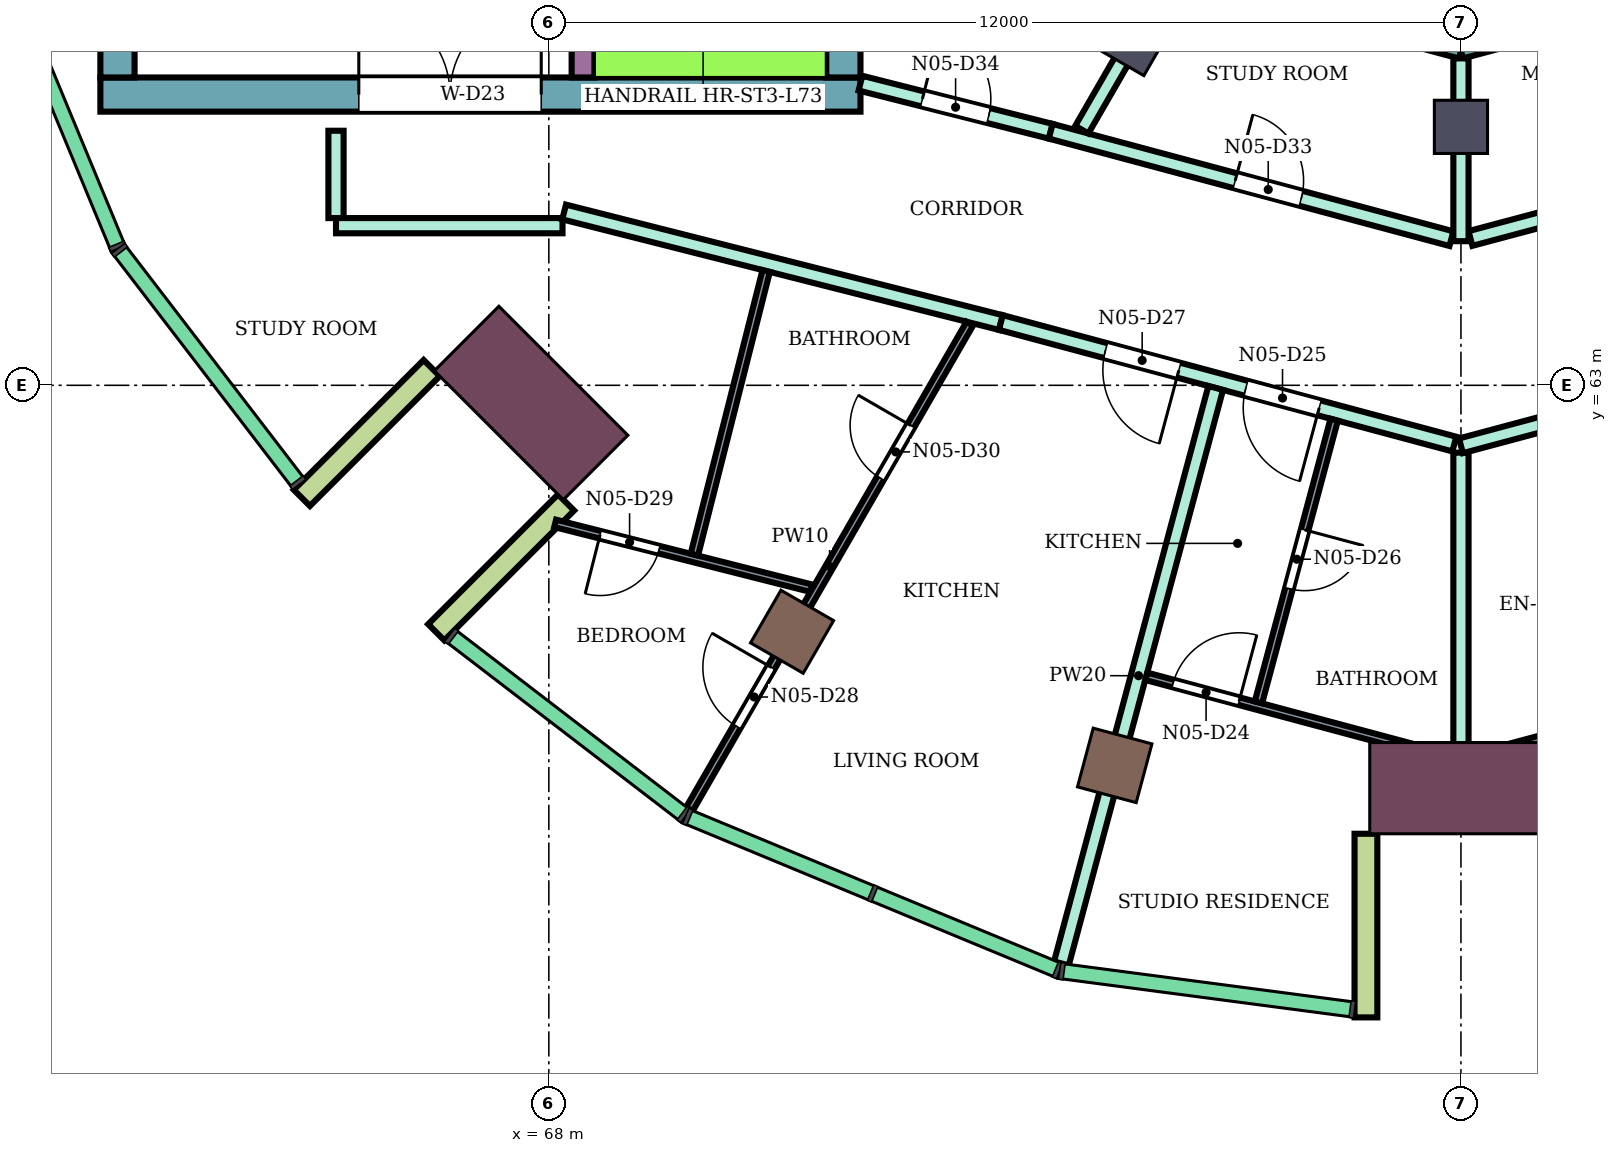
"""IFC4 building model, lengths in metres.
Left out: names, types, materials, properties, quantities, classifications, styles, units other than length and angle.
Written with IfcOpenShell. Run it as: python <this file> out.ifc"""

import sys

from ifc_helpers import new_model, si_unit, direction, frame, frame_2d, origin, origin_2d, place, context, subcontext, project, spatial, rectangle, extrude, element, fill, save


model = new_model("IFC4")
c1 = context("Model", 3, precision=1e-05, world=origin(), true_north=direction((0.0, 1.0)))
c2 = subcontext(c1, "Body", "Model", "MODEL_VIEW")
j1 = project(units=[si_unit("LENGTHUNIT", "METRE"), si_unit("PLANEANGLEUNIT", "RADIAN")], contexts=[c1])
p1 = place(None, origin())
s1 = spatial("IfcSite", under=j1, at=p1, CompositionType="ELEMENT")
p2 = place(p1, origin())
s2 = spatial("IfcBuilding", under=s1, at=p2, CompositionType="ELEMENT")
p3 = place(p2, frame((0.0, 0.0, 319.3)))
s3 = spatial("IfcBuildingStorey", under=s2, at=p3, CompositionType="ELEMENT", Elevation=319.3)
for number, where, z_axis, x_axis in (
    (1, (71.2, 59.758, 0.0), (0.0, 0.0, 1.0), (-0.5, -0.866, 0.0)),
    (2, (75.445, 58.0, 0.0), (0.0, 0.0, 1.0), (-0.259, -0.966, 0.0)),
):
    element("IfcColumn", number, at=place(p3, frame(where, z_axis=z_axis, x_axis=x_axis)), inside=s3, PredefinedType="COLUMN", context=c2, shape_type="SweptSolid", body=[
        extrude(rectangle(XDim=0.8, YDim=0.8, at=origin_2d()), origin(), (0.0, 0.0, 1.0), 4.4),
    ])
for number, where, z_axis, x_axis in (
    (3, (75.7, 67.552, 0.0), (0.0, 0.0, 1.0), (-0.5, -0.866, 0.0)),
    (4, (80.0, 66.4, 0.0), (0.0, 0.0, 1.0), (0.0, -1.0, 0.0)),
):
    element("IfcColumn", number, at=place(p3, frame(where, z_axis=z_axis, x_axis=x_axis)), inside=s3, PredefinedType="COLUMN", context=c2, shape_type="SweptSolid", body=[
        extrude(rectangle(XDim=0.7, YDim=0.7, at=origin_2d()), origin(), (0.0, 0.0, 1.0), 4.4),
    ])
for number, where, z_axis, x_axis in (
    (5, (67.767, 62.767, 0.0), (0.0, 0.0, 1.0), (-0.707, -0.707, 0.0)),
    (6, (80.0, 57.7, 0.0), (0.0, 0.0, 1.0), (0.0, -1.0, 0.0)),
):
    element("IfcColumn", number, at=place(p3, frame(where, z_axis=z_axis, x_axis=x_axis)), inside=s3, PredefinedType="COLUMN", context=c2, shape_type="SweptSolid", body=[
        extrude(rectangle(XDim=1.2, YDim=2.4, at=origin_2d()), origin(), (0.0, 0.0, 1.0), 4.4),
    ])
p4 = place(p3, frame((72.1, 66.825, 0.0), z_axis=(0.0, 0.0, 1.0), x_axis=(-1.0, 0.0, 0.0)))
e7 = element("IfcWall", 7, at=p4, inside=s3, PredefinedType="SHEAR", context=c2, shape_type="SweptSolid", body=[
    extrude(rectangle(XDim=10.0, YDim=0.45, at=frame_2d((5.0, 0.0))), origin(), (0.0, 0.0, 1.0), 4.08),
])
p5 = place(p4, frame((4.2, 0.0, 0.0)))
e8 = element("IfcOpeningElement", 8, at=p5, cuts=e7, PredefinedType="OPENING", context=c2, shape_type="SweptSolid", body=[
    extrude(rectangle(XDim=2.4, YDim=2.4, at=frame_2d((1.2, 1.2))), frame((0.0, 0.235, 0.0), z_axis=(0.0, -1.0, 0.0), x_axis=(1.0, 0.0, 0.0)), (0.0, 0.0, 1.0), 0.47),
])
p6 = place(p3, frame((71.875, 75.0, 0.0), z_axis=(0.0, 0.0, 1.0), x_axis=(0.0, -1.0, 0.0)))
e9 = element("IfcWall", 9, at=p6, inside=s3, PredefinedType="SHEAR", context=c2, shape_type="SweptSolid", body=[
    extrude(rectangle(XDim=7.95, YDim=0.45, at=frame_2d((3.975, 0.0))), origin(), (0.0, 0.0, 1.0), 4.08),
])
p7 = place(p3, frame((62.325, 76.4, 0.0), z_axis=(0.0, 0.0, 1.0), x_axis=(0.0, -1.0, 0.0)))
e10 = element("IfcWall", 10, at=p7, inside=s3, PredefinedType="SHEAR", context=c2, shape_type="SweptSolid", body=[
    extrude(rectangle(XDim=9.35, YDim=0.45, at=frame_2d((4.675, 0.0))), origin(), (0.0, 0.0, 1.0), 4.08),
])
p8 = place(p3, frame((68.45, 75.0, 0.0), z_axis=(0.0, 0.0, 1.0), x_axis=(0.0, -1.0, 0.0)))
e11 = element("IfcWall", 11, at=p8, inside=s3, PredefinedType="SHEAR", context=c2, shape_type="SweptSolid", body=[
    extrude(rectangle(XDim=7.95, YDim=0.3, at=frame_2d((3.975, 0.0))), origin(), (0.0, 0.0, 1.0), 4.08),
])
p9 = place(p8, frame((1.85, 0.0, 0.0)))
e12 = element("IfcOpeningElement", 12, at=p9, cuts=e11, PredefinedType="OPENING", context=c2, shape_type="SweptSolid", body=[
    extrude(rectangle(XDim=0.9, YDim=2.1, at=frame_2d((0.45, 1.05))), frame((0.0, 0.16, 0.0), z_axis=(0.0, -1.0, 0.0), x_axis=(1.0, 0.0, 0.0)), (0.0, 0.0, 1.0), 0.32),
])
for number, where, z_axis, x_axis in (
    (13, (66.459, 63.227, 0.0), (0.0, 0.0, 1.0), (-0.707, -0.707, 0.0)),
    (14, (68.227, 61.459, 0.0), (0.0, 0.0, 1.0), (-0.707, -0.707, 0.0)),
    (15, (78.75, 57.1, 0.0), (0.0, 0.0, 1.0), (0.0, -1.0, 0.0)),
):
    element("IfcWall", number, at=place(p3, frame(where, z_axis=z_axis, x_axis=x_axis)), inside=s3, PredefinedType="NOTDEFINED", context=c2, shape_type="SweptSolid", body=[
        extrude(rectangle(XDim=2.416, YDim=0.3, at=frame_2d((1.208, 0.0))), origin(), (0.0, 0.0, 1.0), 4.4),
    ])
p10 = place(p3, frame((76.198, 68.415, 0.0), z_axis=(0.0, 0.0, 1.0), x_axis=(0.965933654434, -0.258789828301, 0.0)))
e16 = element("IfcWall", 16, at=p10, inside=s3, PredefinedType="NOTDEFINED", context=c2, shape_type="SweptSolid", body=[
    extrude(rectangle(XDim=3.936, YDim=0.2, at=frame_2d((1.968, 0.0))), origin(), (0.0, 0.0, 1.0), 4.4),
])
p11 = place(p10, frame((0.468, 0.0, 0.9)))
e17 = element("IfcOpeningElement", 17, at=p11, cuts=e16, PredefinedType="OPENING", context=c2, shape_type="SweptSolid", body=[
    extrude(rectangle(XDim=3.0, YDim=2.3, at=frame_2d((1.5, 1.15))), frame((0.0, 0.11, 0.0), z_axis=(0.0, -1.0, 0.0), x_axis=(1.0, 0.0, 0.0)), (0.0, 0.0, 1.0), 0.22),
])
p12 = place(p3, frame((80.0, 67.396, 0.0), z_axis=(0.0, 0.0, 1.0), x_axis=(0.965933654434, 0.258789828301, 0.0)))
e18 = element("IfcWall", 18, at=p12, inside=s3, PredefinedType="NOTDEFINED", context=c2, shape_type="SweptSolid", body=[
    extrude(rectangle(XDim=3.936, YDim=0.2, at=frame_2d((1.968, 0.0))), origin(), (0.0, 0.0, 1.0), 4.4),
])
p13 = place(p12, frame((0.468, 0.0, 0.9)))
e19 = element("IfcOpeningElement", 19, at=p13, cuts=e18, PredefinedType="OPENING", context=c2, shape_type="SweptSolid", body=[
    extrude(rectangle(XDim=3.0, YDim=2.3, at=frame_2d((1.5, 1.15))), frame((0.0, 0.11, 0.0), z_axis=(0.0, -1.0, 0.0), x_axis=(1.0, 0.0, 0.0)), (0.0, 0.0, 1.0), 0.22),
])
p14 = place(p3, frame((65.2, 65.2, 0.0), z_axis=(0.0, 0.0, 1.0), x_axis=(0.0, 1.0, 0.0)))
e20 = element("IfcWall", 20, at=p14, inside=s3, PredefinedType="PARTITIONING", context=c2, shape_type="SweptSolid", body=[
    extrude(rectangle(XDim=1.149, YDim=0.2, at=frame_2d((0.575, 0.0))), origin(), (0.0, 0.0, 1.0), 3.95),
])
p15 = place(p3, frame((65.2, 65.1, 0.0), z_axis=(0.0, 0.0, 1.0), x_axis=(1.0, 0.0, 0.0)))
e21 = element("IfcWall", 21, at=p15, inside=s3, PredefinedType="PARTITIONING", context=c2, shape_type="SweptSolid", body=[
    extrude(rectangle(XDim=2.98, YDim=0.2, at=frame_2d((1.49, 0.0))), origin(), (0.0, 0.0, 1.0), 3.95),
])
p16 = place(p3, frame((68.201, 65.28, 0.0), z_axis=(0.0, 0.0, 1.0), x_axis=(0.969421088032, -0.245403247897, 0.0)))
e22 = element("IfcWall", 22, at=p16, inside=s3, PredefinedType="PARTITIONING", context=c2, shape_type="SweptSolid", body=[
    extrude(rectangle(XDim=5.927, YDim=0.2, at=frame_2d((2.964, 0.0))), origin(), (0.0, 0.0, 1.0), 3.95),
])
p17 = place(p3, frame((72.1, 66.975, 0.0), z_axis=(0.0, 0.0, 1.0), x_axis=(0.969471314457, -0.245204752086, 0.0)))
e23 = element("IfcWall", 23, at=p17, inside=s3, PredefinedType="PARTITIONING", context=c2, shape_type="SweptSolid", body=[
    extrude(rectangle(XDim=2.582, YDim=0.2, at=frame_2d((1.291, 0.0))), origin(), (0.0, 0.0, 1.0), 3.95),
])
p18 = place(p17, frame((0.841, 0.0, 0.0)))
e24 = element("IfcOpeningElement", 24, at=p18, cuts=e23, PredefinedType="OPENING", context=c2, shape_type="SweptSolid", body=[
    extrude(rectangle(XDim=0.9, YDim=2.1, at=frame_2d((0.45, 1.05))), frame((0.0, 0.11, 0.0), z_axis=(0.0, -1.0, 0.0), x_axis=(1.0, 0.0, 0.0)), (0.0, 0.0, 1.0), 0.22),
])
p19 = place(p3, frame((73.947, 63.826, 0.0), z_axis=(0.0, 0.0, 1.0), x_axis=(0.965894934009, -0.25893430915, 0.0)))
e25 = element("IfcWall", 25, at=p19, inside=s3, PredefinedType="PARTITIONING", context=c2, shape_type="SweptSolid", body=[
    extrude(rectangle(XDim=6.177, YDim=0.2, at=frame_2d((3.088, 0.0))), origin(), (0.0, 0.0, 1.0), 3.95),
])
p20 = place(p19, frame((3.336, 0.0, 0.0)))
e26 = element("IfcOpeningElement", 26, at=p20, cuts=e25, PredefinedType="OPENING", context=c2, shape_type="SweptSolid", body=[
    extrude(rectangle(XDim=1.0, YDim=2.1, at=frame_2d((0.5, 1.05))), frame((0.0, 0.11, 0.0), z_axis=(0.0, -1.0, 0.0), x_axis=(1.0, 0.0, 0.0)), (0.0, 0.0, 1.0), 0.22),
])
p21 = place(p19, frame((1.424, 0.0, 0.0)))
e27 = element("IfcOpeningElement", 27, at=p21, cuts=e25, PredefinedType="OPENING", context=c2, shape_type="SweptSolid", body=[
    extrude(rectangle(XDim=1.0, YDim=2.1, at=frame_2d((0.5, 1.05))), frame((0.0, 0.11, 0.0), z_axis=(0.0, -1.0, 0.0), x_axis=(1.0, 0.0, 0.0)), (0.0, 0.0, 1.0), 0.22),
])
p22 = place(p3, frame((74.603, 66.342, 0.0), z_axis=(0.0, 0.0, 1.0), x_axis=(0.965920893652, -0.258837453254, 0.0)))
e28 = element("IfcWall", 28, at=p22, inside=s3, PredefinedType="PARTITIONING", context=c2, shape_type="SweptSolid", body=[
    extrude(rectangle(XDim=5.458, YDim=0.2, at=frame_2d((2.729, 0.0))), origin(), (0.0, 0.0, 1.0), 3.95),
])
p23 = place(p22, frame((2.512, 0.0, 0.0)))
e29 = element("IfcOpeningElement", 29, at=p23, cuts=e28, PredefinedType="OPENING", context=c2, shape_type="SweptSolid", body=[
    extrude(rectangle(XDim=0.9, YDim=2.1, at=frame_2d((0.45, 1.05))), frame((0.0, 0.11, 0.0), z_axis=(0.0, -1.0, 0.0), x_axis=(1.0, 0.0, 0.0)), (0.0, 0.0, 1.0), 0.22),
])
p24 = place(p3, frame((74.743, 55.394, 0.0), z_axis=(0.0, 0.0, 1.0), x_axis=(0.258969103378, 0.965885605802, 0.0)))
e30 = element("IfcWall", 30, at=p24, inside=s3, PredefinedType="PARTITIONING", context=c2, shape_type="SweptSolid", body=[
    extrude(rectangle(XDim=7.838, YDim=0.2, at=frame_2d((3.919, 0.0))), origin(), (0.0, 0.0, 1.0), 3.95),
])
p25 = place(p3, frame((75.012, 66.363, 0.0), z_axis=(0.0, 0.0, 1.0), x_axis=(0.500143511652, 0.865942531438, 0.0)))
e31 = element("IfcWall", 31, at=p25, inside=s3, PredefinedType="PARTITIONING", context=c2, shape_type="SweptSolid", body=[
    extrude(rectangle(XDim=2.275, YDim=0.2, at=frame_2d((1.138, 0.0))), origin(), (0.0, 0.0, 1.0), 3.95),
])
p26 = place(p3, frame((80.125, 64.932, 0.0), z_axis=(0.0, 0.0, 1.0), x_axis=(0.966236955806, 0.257655089674, 0.0)))
e32 = element("IfcWall", 32, at=p26, inside=s3, PredefinedType="PARTITIONING", context=c2, shape_type="SweptSolid", body=[
    extrude(rectangle(XDim=8.039, YDim=0.2, at=frame_2d((4.02, 0.0))), origin(), (0.0, 0.0, 1.0), 3.95),
])
p27 = place(p26, frame((6.298, 0.0, 0.0)))
e33 = element("IfcOpeningElement", 33, at=p27, cuts=e32, PredefinedType="OPENING", context=c2, shape_type="SweptSolid", body=[
    extrude(rectangle(XDim=0.9, YDim=2.1, at=frame_2d((0.45, 1.05))), frame((0.0, 0.11, 0.0), z_axis=(0.0, -1.0, 0.0), x_axis=(1.0, 0.0, 0.0)), (0.0, 0.0, 1.0), 0.22),
])
p28 = place(p26, frame((2.045, 0.0, 0.0)))
e34 = element("IfcOpeningElement", 34, at=p28, cuts=e32, PredefinedType="OPENING", context=c2, shape_type="SweptSolid", body=[
    extrude(rectangle(XDim=0.9, YDim=2.1, at=frame_2d((0.45, 1.05))), frame((0.0, 0.11, 0.0), z_axis=(0.0, -1.0, 0.0), x_axis=(1.0, 0.0, 0.0)), (0.0, 0.0, 1.0), 0.22),
])
p29 = place(p3, frame((80.0, 57.3, 0.0), z_axis=(0.0, 0.0, 1.0), x_axis=(0.0, 1.0, 0.0)))
e35 = element("IfcWall", 35, at=p29, inside=s3, PredefinedType="PARTITIONING", context=c2, shape_type="SweptSolid", body=[
    extrude(rectangle(XDim=4.814, YDim=0.2, at=frame_2d((2.407, 0.0))), origin(), (0.0, 0.0, 1.0), 3.95),
])
p30 = place(p3, frame((80.0, 62.204, 0.0), z_axis=(0.0, 0.0, 1.0), x_axis=(0.965938139786, 0.258773086132, 0.0)))
e36 = element("IfcWall", 36, at=p30, inside=s3, PredefinedType="PARTITIONING", context=c2, shape_type="SweptSolid", body=[
    extrude(rectangle(XDim=6.266, YDim=0.2, at=frame_2d((3.133, 0.0))), origin(), (0.0, 0.0, 1.0), 3.95),
])
p31 = place(p3, frame((80.0, 64.896, 0.0), z_axis=(0.0, 0.0, 1.0), x_axis=(0.0, 1.0, 0.0)))
e37 = element("IfcWall", 37, at=p31, inside=s3, PredefinedType="PARTITIONING", context=c2, shape_type="SweptSolid", body=[
    extrude(rectangle(XDim=2.405, YDim=0.2, at=frame_2d((1.203, 0.0))), origin(), (0.0, 0.0, 1.0), 3.95),
])
p32 = place(p3, frame((68.083, 61.184, 0.0), z_axis=(0.0, 0.0, 1.0), x_axis=(0.969415105271, -0.245426880503, 0.0)))
e38 = element("IfcWall", 38, at=p32, inside=s3, PredefinedType="PARTITIONING", context=c2, shape_type="SweptSolid", body=[
    extrude(rectangle(XDim=3.476, YDim=0.1, at=frame_2d((1.738, 0.0))), origin(), (0.0, 0.0, 1.0), 3.95),
])
p33 = place(p32, frame((0.61, 0.0, 0.0)))
e39 = element("IfcOpeningElement", 39, at=p33, cuts=e38, PredefinedType="OPENING", context=c2, shape_type="SweptSolid", body=[
    extrude(rectangle(XDim=0.8, YDim=2.1, at=frame_2d((0.4, 1.05))), frame((0.0, 0.06, 0.0), z_axis=(0.0, -1.0, 0.0), x_axis=(1.0, 0.0, 0.0)), (0.0, 0.0, 1.0), 0.12),
])
p34 = place(p3, frame((69.849, 57.424, 0.0), z_axis=(0.0, 0.0, 1.0), x_axis=(0.500112137663, 0.865960651394, 0.0)))
e40 = element("IfcWall", 40, at=p34, inside=s3, PredefinedType="PARTITIONING", context=c2, shape_type="SweptSolid", body=[
    extrude(rectangle(XDim=7.375, YDim=0.1, at=frame_2d((3.688, 0.0))), origin(), (0.0, 0.0, 1.0), 3.95),
])
p35 = place(p34, frame((1.254, 0.0, 0.0)))
e41 = element("IfcOpeningElement", 41, at=p35, cuts=e40, PredefinedType="OPENING", context=c2, shape_type="SweptSolid", body=[
    extrude(rectangle(XDim=0.9, YDim=2.1, at=frame_2d((0.45, 1.05))), frame((0.0, 0.06, 0.0), z_axis=(0.0, -1.0, 0.0), x_axis=(1.0, 0.0, 0.0)), (0.0, 0.0, 1.0), 0.12),
])
p36 = place(p34, frame((5.027, 0.0, 0.0)))
e42 = element("IfcOpeningElement", 42, at=p36, cuts=e40, PredefinedType="OPENING", context=c2, shape_type="SweptSolid", body=[
    extrude(rectangle(XDim=0.8, YDim=2.1, at=frame_2d((0.4, 1.05))), frame((0.0, 0.06, 0.0), z_axis=(0.0, -1.0, 0.0), x_axis=(1.0, 0.0, 0.0)), (0.0, 0.0, 1.0), 0.12),
])
p37 = place(p3, frame((69.914, 60.772, 0.0), z_axis=(0.0, 0.0, 1.0), x_axis=(0.245489008107, 0.969399374303, 0.0)))
e43 = element("IfcWall", 43, at=p37, inside=s3, PredefinedType="PARTITIONING", context=c2, shape_type="SweptSolid", body=[
    extrude(rectangle(XDim=3.85, YDim=0.1, at=frame_2d((1.925, 0.0))), origin(), (0.0, 0.0, 1.0), 3.95),
])
p38 = place(p3, frame((75.862, 59.171, 0.0), z_axis=(0.0, 0.0, 1.0), x_axis=(0.965961623338, -0.258685411723, 0.0)))
e44 = element("IfcWall", 44, at=p38, inside=s3, PredefinedType="PARTITIONING", context=c2, shape_type="SweptSolid", body=[
    extrude(rectangle(XDim=4.174, YDim=0.1, at=frame_2d((2.087, 0.0))), origin(), (0.0, 0.0, 1.0), 3.95),
])
p39 = place(p38, frame((0.363, 0.0, 0.0)))
e45 = element("IfcOpeningElement", 45, at=p39, cuts=e44, PredefinedType="OPENING", context=c2, shape_type="SweptSolid", body=[
    extrude(rectangle(XDim=0.9, YDim=2.1, at=frame_2d((0.45, 1.05))), frame((0.0, 0.06, 0.0), z_axis=(0.0, -1.0, 0.0), x_axis=(1.0, 0.0, 0.0)), (0.0, 0.0, 1.0), 0.12),
])
p40 = place(p3, frame((77.336, 58.828, 0.0), z_axis=(0.0, 0.0, 1.0), x_axis=(0.25872023695, 0.965952296437, 0.0)))
e46 = element("IfcWall", 46, at=p40, inside=s3, PredefinedType="PARTITIONING", context=c2, shape_type="SweptSolid", body=[
    extrude(rectangle(XDim=3.85, YDim=0.1, at=frame_2d((1.925, 0.0))), origin(), (0.0, 0.0, 1.0), 3.95),
])
p41 = place(p40, frame((1.55, 0.0, 0.0)))
e47 = element("IfcOpeningElement", 47, at=p41, cuts=e46, PredefinedType="OPENING", context=c2, shape_type="SweptSolid", body=[
    extrude(rectangle(XDim=0.8, YDim=2.1, at=frame_2d((0.4, 1.05))), frame((0.0, 0.06, 0.0), z_axis=(0.0, -1.0, 0.0), x_axis=(1.0, 0.0, 0.0)), (0.0, 0.0, 1.0), 0.12),
])
p42 = place(p3, frame((80.106, 58.092, 0.0), z_axis=(0.0, 0.0, 1.0), x_axis=(0.965971139599, 0.258649874274, 0.0)))
e48 = element("IfcWall", 48, at=p42, inside=s3, PredefinedType="PARTITIONING", context=c2, shape_type="SweptSolid", body=[
    extrude(rectangle(XDim=8.588, YDim=0.1, at=frame_2d((4.294, 0.0))), origin(), (0.0, 0.0, 1.0), 3.95),
])
p43 = place(p42, frame((1.682, 0.0, 0.0)))
e49 = element("IfcOpeningElement", 49, at=p43, cuts=e48, PredefinedType="OPENING", context=c2, shape_type="SweptSolid", body=[
    extrude(rectangle(XDim=0.8, YDim=2.1, at=frame_2d((0.4, 1.05))), frame((0.0, 0.06, 0.0), z_axis=(0.0, -1.0, 0.0), x_axis=(1.0, 0.0, 0.0)), (0.0, 0.0, 1.0), 0.12),
])
p44 = place(p39, origin())
e50 = element("IfcDoor", 50, at=p44, inside=s3, OperationType="SINGLE_SWING_RIGHT", PredefinedType="DOOR", context=c2, shape_type="SweptSolid", body=[
    extrude(rectangle(XDim=0.9, YDim=2.1, at=frame_2d((0.45, 1.05))), frame((0.0, 0.025, 0.0), z_axis=(0.0, -1.0, 0.0), x_axis=(1.0, 0.0, 0.0)), (0.0, 0.0, 1.0), 0.05),
])
fill(e45, e50)
p45 = place(p20, frame((1.0, 0.0, 0.0), z_axis=(0.0, 0.0, 1.0), x_axis=(-1.0, 0.0, 0.0)))
e51 = element("IfcDoor", 51, at=p45, inside=s3, OperationType="SINGLE_SWING_LEFT", PredefinedType="DOOR", context=c2, shape_type="SweptSolid", body=[
    extrude(rectangle(XDim=1.0, YDim=2.1, at=frame_2d((0.5, 1.05))), frame((0.0, 0.025, 0.0), z_axis=(0.0, -1.0, 0.0), x_axis=(1.0, 0.0, 0.0)), (0.0, 0.0, 1.0), 0.05),
])
fill(e26, e51)
p46 = place(p41, frame((0.8, 0.0, 0.0), z_axis=(0.0, 0.0, 1.0), x_axis=(-1.0, 0.0, 0.0)))
e52 = element("IfcDoor", 52, at=p46, inside=s3, OperationType="SINGLE_SWING_LEFT", PredefinedType="DOOR", context=c2, shape_type="SweptSolid", body=[
    extrude(rectangle(XDim=0.8, YDim=2.1, at=frame_2d((0.4, 1.05))), frame((0.0, 0.025, 0.0), z_axis=(0.0, -1.0, 0.0), x_axis=(1.0, 0.0, 0.0)), (0.0, 0.0, 1.0), 0.05),
])
fill(e47, e52)
p47 = place(p21, frame((1.0, 0.0, 0.0), z_axis=(0.0, 0.0, 1.0), x_axis=(-1.0, 0.0, 0.0)))
e53 = element("IfcDoor", 53, at=p47, inside=s3, OperationType="SINGLE_SWING_LEFT", PredefinedType="DOOR", context=c2, shape_type="SweptSolid", body=[
    extrude(rectangle(XDim=1.0, YDim=2.1, at=frame_2d((0.5, 1.05))), frame((0.0, 0.025, 0.0), z_axis=(0.0, -1.0, 0.0), x_axis=(1.0, 0.0, 0.0)), (0.0, 0.0, 1.0), 0.05),
])
fill(e27, e53)
p48 = place(p35, origin())
e54 = element("IfcDoor", 54, at=p48, inside=s3, OperationType="SINGLE_SWING_RIGHT", PredefinedType="DOOR", context=c2, shape_type="SweptSolid", body=[
    extrude(rectangle(XDim=0.9, YDim=2.1, at=frame_2d((0.45, 1.05))), frame((0.0, 0.025, 0.0), z_axis=(0.0, -1.0, 0.0), x_axis=(1.0, 0.0, 0.0)), (0.0, 0.0, 1.0), 0.05),
])
fill(e41, e54)
p49 = place(p33, frame((0.8, 0.0, 0.0), z_axis=(0.0, 0.0, 1.0), x_axis=(-1.0, 0.0, 0.0)))
e55 = element("IfcDoor", 55, at=p49, inside=s3, OperationType="SINGLE_SWING_RIGHT", PredefinedType="DOOR", context=c2, shape_type="SweptSolid", body=[
    extrude(rectangle(XDim=0.8, YDim=2.1, at=frame_2d((0.4, 1.05))), frame((0.0, 0.025, 0.0), z_axis=(0.0, -1.0, 0.0), x_axis=(1.0, 0.0, 0.0)), (0.0, 0.0, 1.0), 0.05),
])
fill(e39, e55)
p50 = place(p36, origin())
e56 = element("IfcDoor", 56, at=p50, inside=s3, OperationType="SINGLE_SWING_RIGHT", PredefinedType="DOOR", context=c2, shape_type="SweptSolid", body=[
    extrude(rectangle(XDim=0.8, YDim=2.1, at=frame_2d((0.4, 1.05))), frame((0.0, 0.025, 0.0), z_axis=(0.0, -1.0, 0.0), x_axis=(1.0, 0.0, 0.0)), (0.0, 0.0, 1.0), 0.05),
])
fill(e42, e56)
p51 = place(p23, origin())
e57 = element("IfcDoor", 57, at=p51, inside=s3, OperationType="SINGLE_SWING_LEFT", PredefinedType="DOOR", context=c2, shape_type="SweptSolid", body=[
    extrude(rectangle(XDim=0.9, YDim=2.1, at=frame_2d((0.45, 1.05))), frame((0.0, 0.025, 0.0), z_axis=(0.0, -1.0, 0.0), x_axis=(1.0, 0.0, 0.0)), (0.0, 0.0, 1.0), 0.05),
])
fill(e29, e57)
p52 = place(p18, origin())
e58 = element("IfcDoor", 58, at=p52, inside=s3, OperationType="SINGLE_SWING_LEFT", PredefinedType="DOOR", context=c2, shape_type="SweptSolid", body=[
    extrude(rectangle(XDim=0.9, YDim=2.1, at=frame_2d((0.45, 1.05))), frame((0.0, 0.025, 0.0), z_axis=(0.0, -1.0, 0.0), x_axis=(1.0, 0.0, 0.0)), (0.0, 0.0, 1.0), 0.05),
])
fill(e24, e58)
p53 = place(p5, frame((2.4, 0.0, 0.0), z_axis=(0.0, 0.0, 1.0), x_axis=(-1.0, 0.0, 0.0)))
e59 = element("IfcDoor", 59, at=p53, inside=s3, OperationType="DOUBLE_DOOR_SINGLE_SWING", PredefinedType="DOOR", context=c2, shape_type="SweptSolid", body=[
    extrude(rectangle(XDim=2.4, YDim=2.4, at=frame_2d((1.2, 1.2))), frame((0.0, 0.025, 0.0), z_axis=(0.0, -1.0, 0.0), x_axis=(1.0, 0.0, 0.0)), (0.0, 0.0, 1.0), 0.05),
])
fill(e8, e59)
save(model, sys.argv[1])
